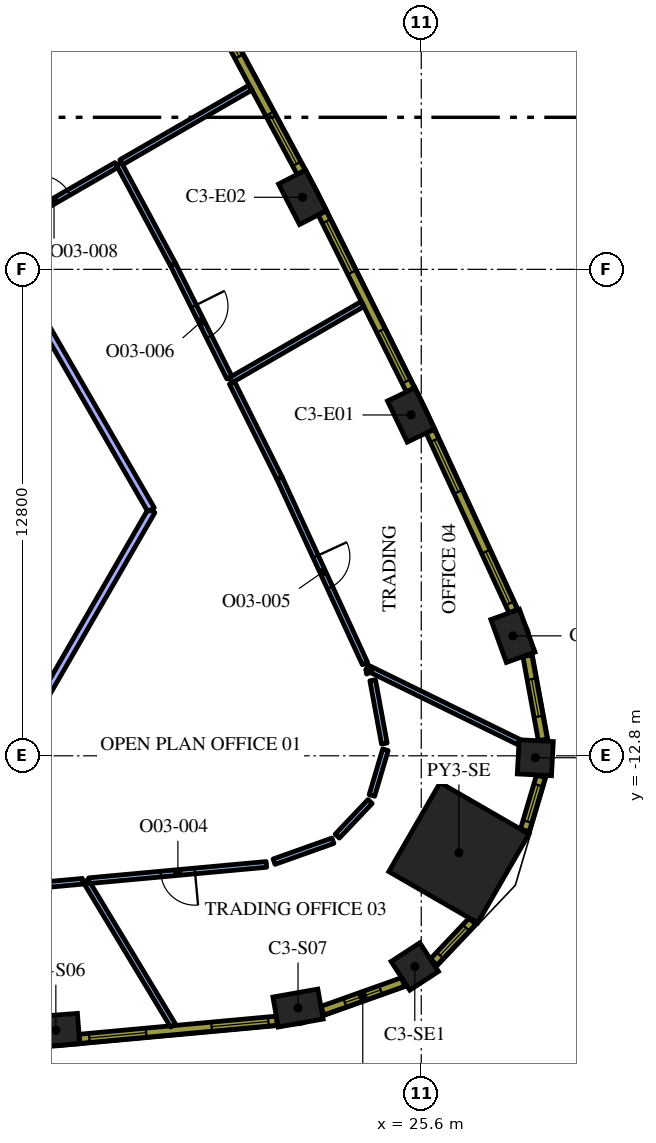
"""IFC4 building model, lengths in metres.
Left out: names, types, materials, properties, quantities, classifications, styles, units other than length and angle.
Written with IfcOpenShell. Run it as: python <this file> out.ifc"""

import sys

from ifc_helpers import new_model, si_unit, direction, frame, frame_2d, origin, origin_2d, place, context, subcontext, project, spatial, rectangle, extrude, element, fill, save


model = new_model("IFC4")
c1 = context("Model", 3, precision=1e-05, world=origin(), true_north=direction((0.0, 1.0)))
c2 = subcontext(c1, "Body", "Model", "MODEL_VIEW")
j1 = project(units=[si_unit("LENGTHUNIT", "METRE"), si_unit("PLANEANGLEUNIT", "RADIAN")], contexts=[c1])
p1 = place(None, origin())
s1 = spatial("IfcSite", under=j1, at=p1, CompositionType="ELEMENT")
p2 = place(p1, origin())
s2 = spatial("IfcBuilding", under=s1, at=p2, CompositionType="ELEMENT")
p3 = place(p2, frame((0.0, 0.0, 175.2)))
s3 = spatial("IfcBuildingStorey", under=s2, at=p3, CompositionType="ELEMENT", Elevation=175.2)
p4 = place(p3, frame((26.591, -15.352, 0.0), z_axis=(0.0, 0.0, 1.0), x_axis=(0.866025403784, -0.5, 0.0)))
e1 = element("IfcColumn", 1, at=p4, inside=s3, PredefinedType="COLUMN", context=c2, shape_type="SweptSolid", body=[
    extrude(rectangle(XDim=2.7, YDim=2.7, at=origin_2d()), origin(), (0.0, 0.0, 1.0), 4.2),
])
for number, where, z_axis, x_axis in (
    (2, (15.985, -20.022, 0.0), (0.0, 0.0, 1.0), (0.997, 0.076, 0.0)),
    (3, (22.357, -19.437, 0.0), (0.0, 0.0, 1.0), (0.985, 0.175, 0.0)),
):
    element("IfcColumn", number, at=place(p3, frame(where, z_axis=z_axis, x_axis=x_axis)), inside=s3, PredefinedType="COLUMN", context=c2, shape_type="SweptSolid", body=[
        extrude(rectangle(XDim=1.2, YDim=0.8, at=origin_2d()), origin(), (0.0, 0.0, 1.0), 4.2),
    ])
for number, where, z_axis, x_axis in (
    (4, (25.43, -18.344, 0.0), (0.0, 0.0, 1.0), (0.838, 0.546, 0.0)),
    (5, (28.601, -12.851, 0.0), (0.0, 0.0, 1.0), (0.053, 0.999, 0.0)),
):
    element("IfcColumn", number, at=place(p3, frame(where, z_axis=z_axis, x_axis=x_axis)), inside=s3, PredefinedType="COLUMN", context=c2, shape_type="SweptSolid", body=[
        extrude(rectangle(XDim=0.9, YDim=0.9, at=origin_2d()), origin(), (0.0, 0.0, 1.0), 4.2),
    ])
for number, where, z_axis, x_axis in (
    (6, (28.012, -9.644, 0.0), (0.0, 0.0, 1.0), (-0.341, 0.94, 0.0)),
    (7, (25.332, -3.832, 0.0), (0.0, 0.0, 1.0), (-0.433, 0.902, 0.0)),
    (8, (22.476, 1.896, 0.0), (0.0, 0.0, 1.0), (-0.46, 0.888, 0.0)),
):
    element("IfcColumn", number, at=place(p3, frame(where, z_axis=z_axis, x_axis=x_axis)), inside=s3, PredefinedType="COLUMN", context=c2, shape_type="SweptSolid", body=[
        extrude(rectangle(XDim=1.2, YDim=0.8, at=origin_2d()), origin(), (0.0, 0.0, 1.0), 4.2),
    ])
p5 = place(p3, frame((16.773, -16.094, 0.0), z_axis=(0.0, 0.0, 1.0), x_axis=(0.516844039178, -0.856079575253, 0.0)))
e9 = element("IfcWall", 9, at=p5, inside=s3, PredefinedType="PARTITIONING", context=c2, shape_type="SweptSolid", body=[
    extrude(rectangle(XDim=4.446, YDim=0.15, at=frame_2d((2.223, 0.0))), origin(), (0.0, 0.0, 1.0), 3.15),
])
p6 = place(p3, frame((15.692, -16.193, 0.0), z_axis=(0.0, 0.0, 1.0), x_axis=(0.995818997537, 0.091348366946, 0.0)))
e10 = element("IfcWall", 10, at=p6, inside=s3, PredefinedType="PARTITIONING", context=c2, shape_type="SweptSolid", body=[
    extrude(rectangle(XDim=1.002, YDim=0.15, at=frame_2d((0.501, 0.0))), origin(), (0.0, 0.0, 1.0), 3.15),
])
p7 = place(p3, frame((24.169, -10.48, 0.0), z_axis=(0.0, 0.0, 1.0), x_axis=(0.898142173557, -0.439705169491, 0.0)))
e11 = element("IfcWall", 11, at=p7, inside=s3, PredefinedType="PARTITIONING", context=c2, shape_type="SweptSolid", body=[
    extrude(rectangle(XDim=4.458, YDim=0.15, at=frame_2d((2.229, 0.0))), origin(), (0.0, 0.0, 1.0), 3.15),
])
p8 = place(p3, frame((21.525, -15.657, 0.0), z_axis=(0.0, 0.0, 1.0), x_axis=(-0.99581172086, -0.091427657734, 0.0)))
e12 = element("IfcWall", 12, at=p8, inside=s3, PredefinedType="PARTITIONING", context=c2, shape_type="SweptSolid", body=[
    extrude(rectangle(XDim=4.689, YDim=0.15, at=frame_2d((2.344, 0.0))), origin(), (0.0, 0.0, 1.0), 3.15),
])
p9 = place(p8, frame((1.889, 0.0, 0.0)))
e13 = element("IfcOpeningElement", 13, at=p9, cuts=e12, PredefinedType="OPENING", context=c2, shape_type="SweptSolid", body=[
    extrude(rectangle(XDim=0.9, YDim=2.1, at=frame_2d((0.45, 1.05))), frame((0.0, 0.085, 0.0), z_axis=(0.0, -1.0, 0.0), x_axis=(1.0, 0.0, 0.0)), (0.0, 0.0, 1.0), 0.17),
])
p10 = place(p3, frame((21.727, -15.586, 0.0), z_axis=(0.0, 0.0, 1.0), x_axis=(0.942087520852, 0.335367116835, 0.0)))
e14 = element("IfcWall", 14, at=p10, inside=s3, PredefinedType="PARTITIONING", context=c2, shape_type="SweptSolid", body=[
    extrude(rectangle(XDim=1.644, YDim=0.15, at=frame_2d((0.822, 0.0))), origin(), (0.0, 0.0, 1.0), 3.15),
])
p11 = place(p3, frame((23.389, -14.914, 0.0), z_axis=(0.0, 0.0, 1.0), x_axis=(0.688003360899, 0.725707499886, 0.0)))
e15 = element("IfcWall", 15, at=p11, inside=s3, PredefinedType="PARTITIONING", context=c2, shape_type="SweptSolid", body=[
    extrude(rectangle(XDim=1.256, YDim=0.15, at=frame_2d((0.628, 0.0))), origin(), (0.0, 0.0, 1.0), 3.15),
])
p12 = place(p3, frame((24.301, -13.844, 0.0), z_axis=(0.0, 0.0, 1.0), x_axis=(0.284386145133, 0.958709820778, 0.0)))
e16 = element("IfcWall", 16, at=p12, inside=s3, PredefinedType="PARTITIONING", context=c2, shape_type="SweptSolid", body=[
    extrude(rectangle(XDim=1.256, YDim=0.15, at=frame_2d((0.628, 0.0))), origin(), (0.0, 0.0, 1.0), 3.15),
])
p13 = place(p3, frame((24.628, -12.477, 0.0), z_axis=(0.0, 0.0, 1.0), x_axis=(-0.180725554657, 0.98353356521, 0.0)))
e17 = element("IfcWall", 17, at=p13, inside=s3, PredefinedType="PARTITIONING", context=c2, shape_type="SweptSolid", body=[
    extrude(rectangle(XDim=1.693, YDim=0.15, at=frame_2d((0.846, 0.0))), origin(), (0.0, 0.0, 1.0), 3.15),
])
p14 = place(p3, frame((24.233, -10.618, 0.0), z_axis=(0.0, 0.0, 1.0), x_axis=(-0.423685108901, 0.905809543169, 0.0)))
e18 = element("IfcWall", 18, at=p14, inside=s3, PredefinedType="PARTITIONING", context=c2, shape_type="SweptSolid", body=[
    extrude(rectangle(XDim=0.033, YDim=0.15, at=frame_2d((0.017, 0.0))), origin(), (0.0, 0.0, 1.0), 3.15),
])
p15 = place(p3, frame((20.585, -2.916, 0.0), z_axis=(0.0, 0.0, 1.0), x_axis=(0.866041532296, 0.499972063559, 0.0)))
e19 = element("IfcWall", 19, at=p15, inside=s3, PredefinedType="PARTITIONING", context=c2, shape_type="SweptSolid", body=[
    extrude(rectangle(XDim=4.008, YDim=0.15, at=frame_2d((2.004, 0.0))), origin(), (0.0, 0.0, 1.0), 3.15),
])
p16 = place(p3, frame((21.869, -5.493, 0.0), z_axis=(0.0, 0.0, 1.0), x_axis=(0.4187440514, -0.908104299856, 0.0)))
e20 = element("IfcWall", 20, at=p16, inside=s3, PredefinedType="PARTITIONING", context=c2, shape_type="SweptSolid", body=[
    extrude(rectangle(XDim=5.373, YDim=0.15, at=frame_2d((2.686, 0.0))), origin(), (0.0, 0.0, 1.0), 3.15),
])
p17 = place(p16, frame((2.273, 0.0, 0.0)))
e21 = element("IfcOpeningElement", 21, at=p17, cuts=e20, PredefinedType="OPENING", context=c2, shape_type="SweptSolid", body=[
    extrude(rectangle(XDim=0.9, YDim=2.1, at=frame_2d((0.45, 1.05))), frame((0.0, 0.085, 0.0), z_axis=(0.0, -1.0, 0.0), x_axis=(1.0, 0.0, 0.0)), (0.0, 0.0, 1.0), 0.17),
])
p18 = place(p3, frame((21.869, -5.493, 0.0), z_axis=(0.0, 0.0, 1.0), x_axis=(-0.446168399468, 0.894949026099, 0.0)))
e22 = element("IfcWall", 22, at=p18, inside=s3, PredefinedType="PARTITIONING", context=c2, shape_type="SweptSolid", body=[
    extrude(rectangle(XDim=2.804, YDim=0.15, at=frame_2d((1.402, 0.0))), origin(), (0.0, 0.0, 1.0), 3.15),
])
p19 = place(p3, frame((19.066, 0.129, 0.0), z_axis=(0.0, 0.0, 1.0), x_axis=(0.446215695511, -0.894925445543, 0.0)))
e23 = element("IfcWall", 23, at=p19, inside=s3, PredefinedType="PARTITIONING", context=c2, shape_type="SweptSolid", body=[
    extrude(rectangle(XDim=3.328, YDim=0.15, at=frame_2d((1.664, 0.0))), origin(), (0.0, 0.0, 1.0), 3.15),
])
p20 = place(p19, frame((1.228, 0.0, 0.0)))
e24 = element("IfcOpeningElement", 24, at=p20, cuts=e23, PredefinedType="OPENING", context=c2, shape_type="SweptSolid", body=[
    extrude(rectangle(XDim=0.9, YDim=2.1, at=frame_2d((0.45, 1.05))), frame((0.0, 0.085, 0.0), z_axis=(0.0, -1.0, 0.0), x_axis=(1.0, 0.0, 0.0)), (0.0, 0.0, 1.0), 0.17),
])
p21 = place(p3, frame((19.066, 0.129, 0.0), z_axis=(0.0, 0.0, 1.0), x_axis=(-0.473359743891, 0.88086920304, 0.0)))
e25 = element("IfcWall", 25, at=p21, inside=s3, PredefinedType="PARTITIONING", context=c2, shape_type="SweptSolid", body=[
    extrude(rectangle(XDim=3.01, YDim=0.15, at=frame_2d((1.505, 0.0))), origin(), (0.0, 0.0, 1.0), 3.15),
])
p22 = place(p3, frame((17.706, 2.819, 0.0), z_axis=(0.0, 0.0, 1.0), x_axis=(0.866023031919, 0.500004108169, 0.0)))
e26 = element("IfcWall", 26, at=p22, inside=s3, PredefinedType="PARTITIONING", context=c2, shape_type="SweptSolid", body=[
    extrude(rectangle(XDim=3.927, YDim=0.15, at=frame_2d((1.963, 0.0))), origin(), (0.0, 0.0, 1.0), 3.15),
])
p23 = place(p3, frame((14.334, 0.872, 0.0), z_axis=(0.0, 0.0, 1.0), x_axis=(0.866027010039, 0.499997217876, 0.0)))
e27 = element("IfcWall", 27, at=p23, inside=s3, PredefinedType="PARTITIONING", context=c2, shape_type="SweptSolid", body=[
    extrude(rectangle(XDim=3.743, YDim=0.15, at=frame_2d((1.872, 0.0))), origin(), (0.0, 0.0, 1.0), 3.15),
])
p24 = place(p23, frame((1.4, 0.0, 0.0)))
e28 = element("IfcOpeningElement", 28, at=p24, cuts=e27, PredefinedType="OPENING", context=c2, shape_type="SweptSolid", body=[
    extrude(rectangle(XDim=0.9, YDim=2.1, at=frame_2d((0.45, 1.05))), frame((0.0, 0.085, 0.0), z_axis=(0.0, -1.0, 0.0), x_axis=(1.0, 0.0, 0.0)), (0.0, 0.0, 1.0), 0.17),
])
p25 = place(p3, frame((14.766, -12.824, 0.0), z_axis=(0.0, 0.0, 1.0), x_axis=(0.500009869004, 0.866019705837, 0.0)))
e29 = element("IfcWall", 29, at=p25, inside=s3, PredefinedType="PARTITIONING", context=c2, shape_type="SweptSolid", body=[
    extrude(rectangle(XDim=7.475, YDim=0.2, at=frame_2d((3.738, 0.0))), origin(), (0.0, 0.0, 1.0), 3.15),
])
p26 = place(p3, frame((18.489, -6.324, 0.0), z_axis=(0.0, 0.0, 1.0), x_axis=(-0.500003913404, 0.866023144368, 0.0)))
e30 = element("IfcWall", 30, at=p26, inside=s3, PredefinedType="PARTITIONING", context=c2, shape_type="SweptSolid", body=[
    extrude(rectangle(XDim=8.234, YDim=0.2, at=frame_2d((4.117, 0.0))), origin(), (0.0, 0.0, 1.0), 3.15),
])
p27 = place(p3, frame((16.606, -20.247, 0.0), z_axis=(0.0, 0.0, 1.0), x_axis=(0.995808712151, 0.091460422067, 0.0)))
e31 = element("IfcWall", 31, at=p27, inside=s3, PredefinedType="SOLIDWALL", context=c2, shape_type="SweptSolid", body=[
    extrude(rectangle(XDim=5.213, YDim=0.24, at=frame_2d((2.606, 0.0))), origin(), (0.0, 0.0, 1.0), 3.95),
])
p28 = place(p27, frame((0.261, 0.0, 0.9)))
e32 = element("IfcOpeningElement", 32, at=p28, cuts=e31, PredefinedType="OPENING", context=c2, shape_type="SweptSolid", body=[
    extrude(rectangle(XDim=1.5, YDim=2.55, at=frame_2d((0.75, 1.275))), frame((0.0, 0.13, 0.0), z_axis=(0.0, -1.0, 0.0), x_axis=(1.0, 0.0, 0.0)), (0.0, 0.0, 1.0), 0.26),
])
p29 = place(p27, frame((3.492, 0.0, 0.9)))
e33 = element("IfcOpeningElement", 33, at=p29, cuts=e31, PredefinedType="OPENING", context=c2, shape_type="SweptSolid", body=[
    extrude(rectangle(XDim=1.5, YDim=2.55, at=frame_2d((0.75, 1.275))), frame((0.0, 0.13, 0.0), z_axis=(0.0, -1.0, 0.0), x_axis=(1.0, 0.0, 0.0)), (0.0, 0.0, 1.0), 0.26),
])
p30 = place(p3, frame((23.001, -19.505, 0.0), z_axis=(0.0, 0.0, 1.0), x_axis=(0.942099727267, 0.335332825539, 0.0)))
e34 = element("IfcWall", 34, at=p30, inside=s3, PredefinedType="SOLIDWALL", context=c2, shape_type="SweptSolid", body=[
    extrude(rectangle(XDim=2.25, YDim=0.24, at=frame_2d((1.125, 0.0))), origin(), (0.0, 0.0, 1.0), 3.95),
])
p31 = place(p30, frame((0.625, 0.0, 0.9)))
e35 = element("IfcOpeningElement", 35, at=p31, cuts=e34, PredefinedType="OPENING", context=c2, shape_type="SweptSolid", body=[
    extrude(rectangle(XDim=1.0, YDim=2.55, at=frame_2d((0.5, 1.275))), frame((0.0, 0.13, 0.0), z_axis=(0.0, -1.0, 0.0), x_axis=(1.0, 0.0, 0.0)), (0.0, 0.0, 1.0), 0.26),
])
p32 = place(p3, frame((25.927, -18.226, 0.0), z_axis=(0.0, 0.0, 1.0), x_axis=(0.687986858937, 0.725723144133, 0.0)))
e36 = element("IfcWall", 36, at=p32, inside=s3, PredefinedType="SOLIDWALL", context=c2, shape_type="SweptSolid", body=[
    extrude(rectangle(XDim=1.481, YDim=0.24, at=frame_2d((0.741, 0.0))), origin(), (0.0, 0.0, 1.0), 3.95),
])
p33 = place(p32, frame((0.241, 0.0, 0.9)))
e37 = element("IfcOpeningElement", 37, at=p33, cuts=e36, PredefinedType="OPENING", context=c2, shape_type="SweptSolid", body=[
    extrude(rectangle(XDim=1.0, YDim=2.55, at=frame_2d((0.5, 1.275))), frame((0.0, 0.13, 0.0), z_axis=(0.0, -1.0, 0.0), x_axis=(1.0, 0.0, 0.0)), (0.0, 0.0, 1.0), 0.26),
])
p34 = place(p3, frame((28.326, -14.76, 0.0), z_axis=(0.0, 0.0, 1.0), x_axis=(0.284413721403, 0.958701640281, 0.0)))
e38 = element("IfcWall", 38, at=p34, inside=s3, PredefinedType="SOLIDWALL", context=c2, shape_type="SweptSolid", body=[
    extrude(rectangle(XDim=1.482, YDim=0.24, at=frame_2d((0.741, 0.0))), origin(), (0.0, 0.0, 1.0), 3.95),
])
p35 = place(p34, frame((0.241, 0.0, 0.9)))
e39 = element("IfcOpeningElement", 39, at=p35, cuts=e38, PredefinedType="OPENING", context=c2, shape_type="SweptSolid", body=[
    extrude(rectangle(XDim=1.0, YDim=2.55, at=frame_2d((0.5, 1.275))), frame((0.0, 0.13, 0.0), z_axis=(0.0, -1.0, 0.0), x_axis=(1.0, 0.0, 0.0)), (0.0, 0.0, 1.0), 0.26),
])
p36 = place(p3, frame((28.799, -12.38, 0.0), z_axis=(0.0, 0.0, 1.0), x_axis=(-0.180737189259, 0.983531427265, 0.0)))
e40 = element("IfcWall", 40, at=p36, inside=s3, PredefinedType="SOLIDWALL", context=c2, shape_type="SweptSolid", body=[
    extrude(rectangle(XDim=2.25, YDim=0.24, at=frame_2d((1.125, 0.0))), origin(), (0.0, 0.0, 1.0), 3.95),
])
p37 = place(p36, frame((0.625, 0.0, 0.9)))
e41 = element("IfcOpeningElement", 41, at=p37, cuts=e40, PredefinedType="OPENING", context=c2, shape_type="SweptSolid", body=[
    extrude(rectangle(XDim=1.0, YDim=2.55, at=frame_2d((0.5, 1.275))), frame((0.0, 0.13, 0.0), z_axis=(0.0, -1.0, 0.0), x_axis=(1.0, 0.0, 0.0)), (0.0, 0.0, 1.0), 0.26),
])
p38 = place(p3, frame((28.02, -8.992, 0.0), z_axis=(0.0, 0.0, 1.0), x_axis=(-0.418722559465, 0.908114209885, 0.0)))
e42 = element("IfcWall", 42, at=p38, inside=s3, PredefinedType="SOLIDWALL", context=c2, shape_type="SweptSolid", body=[
    extrude(rectangle(XDim=5.213, YDim=0.24, at=frame_2d((2.606, 0.0))), origin(), (0.0, 0.0, 1.0), 3.95),
])
p39 = place(p38, frame((0.221, 0.0, 0.9)))
e43 = element("IfcOpeningElement", 43, at=p39, cuts=e42, PredefinedType="OPENING", context=c2, shape_type="SweptSolid", body=[
    extrude(rectangle(XDim=1.5, YDim=2.55, at=frame_2d((0.75, 1.275))), frame((0.0, 0.13, 0.0), z_axis=(0.0, -1.0, 0.0), x_axis=(1.0, 0.0, 0.0)), (0.0, 0.0, 1.0), 0.26),
])
p40 = place(p38, frame((3.452, 0.0, 0.9)))
e44 = element("IfcOpeningElement", 44, at=p40, cuts=e42, PredefinedType="OPENING", context=c2, shape_type="SweptSolid", body=[
    extrude(rectangle(XDim=1.5, YDim=2.55, at=frame_2d((0.75, 1.275))), frame((0.0, 0.13, 0.0), z_axis=(0.0, -1.0, 0.0), x_axis=(1.0, 0.0, 0.0)), (0.0, 0.0, 1.0), 0.26),
])
p41 = place(p3, frame((25.316, -3.171, 0.0), z_axis=(0.0, 0.0, 1.0), x_axis=(-0.446256171312, 0.8949052629, 0.0)))
e45 = element("IfcWall", 45, at=p41, inside=s3, PredefinedType="SOLIDWALL", context=c2, shape_type="SweptSolid", body=[
    extrude(rectangle(XDim=5.203, YDim=0.24, at=frame_2d((2.602, 0.0))), origin(), (0.0, 0.0, 1.0), 3.95),
])
p42 = place(p41, frame((0.248, 0.0, 0.9)))
e46 = element("IfcOpeningElement", 46, at=p42, cuts=e45, PredefinedType="OPENING", context=c2, shape_type="SweptSolid", body=[
    extrude(rectangle(XDim=1.5, YDim=2.55, at=frame_2d((0.75, 1.275))), frame((0.0, 0.13, 0.0), z_axis=(0.0, -1.0, 0.0), x_axis=(1.0, 0.0, 0.0)), (0.0, 0.0, 1.0), 0.26),
])
p43 = place(p41, frame((3.455, 0.0, 0.9)))
e47 = element("IfcOpeningElement", 47, at=p43, cuts=e45, PredefinedType="OPENING", context=c2, shape_type="SweptSolid", body=[
    extrude(rectangle(XDim=1.5, YDim=2.55, at=frame_2d((0.75, 1.275))), frame((0.0, 0.13, 0.0), z_axis=(0.0, -1.0, 0.0), x_axis=(1.0, 0.0, 0.0)), (0.0, 0.0, 1.0), 0.26),
])
p44 = place(p3, frame((22.44, 2.555, 0.0), z_axis=(0.0, 0.0, 1.0), x_axis=(-0.473349833294, 0.880874528704, 0.0)))
e48 = element("IfcWall", 48, at=p44, inside=s3, PredefinedType="SOLIDWALL", context=c2, shape_type="SweptSolid", body=[
    extrude(rectangle(XDim=5.204, YDim=0.24, at=frame_2d((2.602, 0.0))), origin(), (0.0, 0.0, 1.0), 3.95),
])
p45 = place(p44, frame((0.248, 0.0, 0.9)))
e49 = element("IfcOpeningElement", 49, at=p45, cuts=e48, PredefinedType="OPENING", context=c2, shape_type="SweptSolid", body=[
    extrude(rectangle(XDim=1.5, YDim=2.55, at=frame_2d((0.75, 1.275))), frame((0.0, 0.13, 0.0), z_axis=(0.0, -1.0, 0.0), x_axis=(1.0, 0.0, 0.0)), (0.0, 0.0, 1.0), 0.26),
])
p46 = place(p44, frame((3.455, 0.0, 0.9)))
e50 = element("IfcOpeningElement", 50, at=p46, cuts=e48, PredefinedType="OPENING", context=c2, shape_type="SweptSolid", body=[
    extrude(rectangle(XDim=1.5, YDim=2.55, at=frame_2d((0.75, 1.275))), frame((0.0, 0.13, 0.0), z_axis=(0.0, -1.0, 0.0), x_axis=(1.0, 0.0, 0.0)), (0.0, 0.0, 1.0), 0.26),
])
p47 = place(p9, origin())
e51 = element("IfcDoor", 51, at=p47, inside=s3, OperationType="SINGLE_SWING_LEFT", PredefinedType="DOOR", context=c2, shape_type="SweptSolid", body=[
    extrude(rectangle(XDim=0.9, YDim=2.1, at=frame_2d((0.45, 1.05))), frame((0.0, 0.025, 0.0), z_axis=(0.0, -1.0, 0.0), x_axis=(1.0, 0.0, 0.0)), (0.0, 0.0, 1.0), 0.05),
])
fill(e13, e51)
p48 = place(p17, origin())
e52 = element("IfcDoor", 52, at=p48, inside=s3, OperationType="SINGLE_SWING_RIGHT", PredefinedType="DOOR", context=c2, shape_type="SweptSolid", body=[
    extrude(rectangle(XDim=0.9, YDim=2.1, at=frame_2d((0.45, 1.05))), frame((0.0, 0.025, 0.0), z_axis=(0.0, -1.0, 0.0), x_axis=(1.0, 0.0, 0.0)), (0.0, 0.0, 1.0), 0.05),
])
fill(e21, e52)
p49 = place(p20, origin())
e53 = element("IfcDoor", 53, at=p49, inside=s3, OperationType="SINGLE_SWING_RIGHT", PredefinedType="DOOR", context=c2, shape_type="SweptSolid", body=[
    extrude(rectangle(XDim=0.9, YDim=2.1, at=frame_2d((0.45, 1.05))), frame((0.0, 0.025, 0.0), z_axis=(0.0, -1.0, 0.0), x_axis=(1.0, 0.0, 0.0)), (0.0, 0.0, 1.0), 0.05),
])
fill(e24, e53)
p50 = place(p24, origin())
e54 = element("IfcDoor", 54, at=p50, inside=s3, OperationType="SINGLE_SWING_LEFT", PredefinedType="DOOR", context=c2, shape_type="SweptSolid", body=[
    extrude(rectangle(XDim=0.9, YDim=2.1, at=frame_2d((0.45, 1.05))), frame((0.0, 0.025, 0.0), z_axis=(0.0, -1.0, 0.0), x_axis=(1.0, 0.0, 0.0)), (0.0, 0.0, 1.0), 0.05),
])
fill(e28, e54)
p51 = place(p28, origin())
e55 = element("IfcWindow", 55, at=p51, inside=s3, PartitioningType="SINGLE_PANEL", PredefinedType="WINDOW", context=c2, shape_type="SweptSolid", body=[
    extrude(rectangle(XDim=1.5, YDim=2.55, at=frame_2d((0.75, 1.275))), frame((0.0, 0.04, 0.0), z_axis=(0.0, -1.0, 0.0), x_axis=(1.0, 0.0, 0.0)), (0.0, 0.0, 1.0), 0.06),
])
fill(e32, e55)
p52 = place(p29, origin())
e56 = element("IfcWindow", 56, at=p52, inside=s3, PartitioningType="SINGLE_PANEL", PredefinedType="WINDOW", context=c2, shape_type="SweptSolid", body=[
    extrude(rectangle(XDim=1.5, YDim=2.55, at=frame_2d((0.75, 1.275))), frame((0.0, 0.04, 0.0), z_axis=(0.0, -1.0, 0.0), x_axis=(1.0, 0.0, 0.0)), (0.0, 0.0, 1.0), 0.06),
])
fill(e33, e56)
p53 = place(p31, origin())
e57 = element("IfcWindow", 57, at=p53, inside=s3, PartitioningType="SINGLE_PANEL", PredefinedType="WINDOW", context=c2, shape_type="SweptSolid", body=[
    extrude(rectangle(XDim=1.0, YDim=2.55, at=frame_2d((0.5, 1.275))), frame((0.0, 0.04, 0.0), z_axis=(0.0, -1.0, 0.0), x_axis=(1.0, 0.0, 0.0)), (0.0, 0.0, 1.0), 0.06),
])
fill(e35, e57)
p54 = place(p33, origin())
e58 = element("IfcWindow", 58, at=p54, inside=s3, PartitioningType="SINGLE_PANEL", PredefinedType="WINDOW", context=c2, shape_type="SweptSolid", body=[
    extrude(rectangle(XDim=1.0, YDim=2.55, at=frame_2d((0.5, 1.275))), frame((0.0, 0.04, 0.0), z_axis=(0.0, -1.0, 0.0), x_axis=(1.0, 0.0, 0.0)), (0.0, 0.0, 1.0), 0.06),
])
fill(e37, e58)
p55 = place(p35, origin())
e59 = element("IfcWindow", 59, at=p55, inside=s3, PartitioningType="SINGLE_PANEL", PredefinedType="WINDOW", context=c2, shape_type="SweptSolid", body=[
    extrude(rectangle(XDim=1.0, YDim=2.55, at=frame_2d((0.5, 1.275))), frame((0.0, 0.04, 0.0), z_axis=(0.0, -1.0, 0.0), x_axis=(1.0, 0.0, 0.0)), (0.0, 0.0, 1.0), 0.06),
])
fill(e39, e59)
p56 = place(p37, origin())
e60 = element("IfcWindow", 60, at=p56, inside=s3, PartitioningType="SINGLE_PANEL", PredefinedType="WINDOW", context=c2, shape_type="SweptSolid", body=[
    extrude(rectangle(XDim=1.0, YDim=2.55, at=frame_2d((0.5, 1.275))), frame((0.0, 0.04, 0.0), z_axis=(0.0, -1.0, 0.0), x_axis=(1.0, 0.0, 0.0)), (0.0, 0.0, 1.0), 0.06),
])
fill(e41, e60)
p57 = place(p39, origin())
e61 = element("IfcWindow", 61, at=p57, inside=s3, PartitioningType="SINGLE_PANEL", PredefinedType="WINDOW", context=c2, shape_type="SweptSolid", body=[
    extrude(rectangle(XDim=1.5, YDim=2.55, at=frame_2d((0.75, 1.275))), frame((0.0, 0.04, 0.0), z_axis=(0.0, -1.0, 0.0), x_axis=(1.0, 0.0, 0.0)), (0.0, 0.0, 1.0), 0.06),
])
fill(e43, e61)
p58 = place(p40, origin())
e62 = element("IfcWindow", 62, at=p58, inside=s3, PartitioningType="SINGLE_PANEL", PredefinedType="WINDOW", context=c2, shape_type="SweptSolid", body=[
    extrude(rectangle(XDim=1.5, YDim=2.55, at=frame_2d((0.75, 1.275))), frame((0.0, 0.04, 0.0), z_axis=(0.0, -1.0, 0.0), x_axis=(1.0, 0.0, 0.0)), (0.0, 0.0, 1.0), 0.06),
])
fill(e44, e62)
p59 = place(p42, origin())
e63 = element("IfcWindow", 63, at=p59, inside=s3, PartitioningType="SINGLE_PANEL", PredefinedType="WINDOW", context=c2, shape_type="SweptSolid", body=[
    extrude(rectangle(XDim=1.5, YDim=2.55, at=frame_2d((0.75, 1.275))), frame((0.0, 0.04, 0.0), z_axis=(0.0, -1.0, 0.0), x_axis=(1.0, 0.0, 0.0)), (0.0, 0.0, 1.0), 0.06),
])
fill(e46, e63)
p60 = place(p43, origin())
e64 = element("IfcWindow", 64, at=p60, inside=s3, PartitioningType="SINGLE_PANEL", PredefinedType="WINDOW", context=c2, shape_type="SweptSolid", body=[
    extrude(rectangle(XDim=1.5, YDim=2.55, at=frame_2d((0.75, 1.275))), frame((0.0, 0.04, 0.0), z_axis=(0.0, -1.0, 0.0), x_axis=(1.0, 0.0, 0.0)), (0.0, 0.0, 1.0), 0.06),
])
fill(e47, e64)
p61 = place(p45, origin())
e65 = element("IfcWindow", 65, at=p61, inside=s3, PartitioningType="SINGLE_PANEL", PredefinedType="WINDOW", context=c2, shape_type="SweptSolid", body=[
    extrude(rectangle(XDim=1.5, YDim=2.55, at=frame_2d((0.75, 1.275))), frame((0.0, 0.04, 0.0), z_axis=(0.0, -1.0, 0.0), x_axis=(1.0, 0.0, 0.0)), (0.0, 0.0, 1.0), 0.06),
])
fill(e49, e65)
p62 = place(p46, origin())
e66 = element("IfcWindow", 66, at=p62, inside=s3, PartitioningType="SINGLE_PANEL", PredefinedType="WINDOW", context=c2, shape_type="SweptSolid", body=[
    extrude(rectangle(XDim=1.5, YDim=2.55, at=frame_2d((0.75, 1.275))), frame((0.0, 0.04, 0.0), z_axis=(0.0, -1.0, 0.0), x_axis=(1.0, 0.0, 0.0)), (0.0, 0.0, 1.0), 0.06),
])
fill(e50, e66)
save(model, sys.argv[1])
